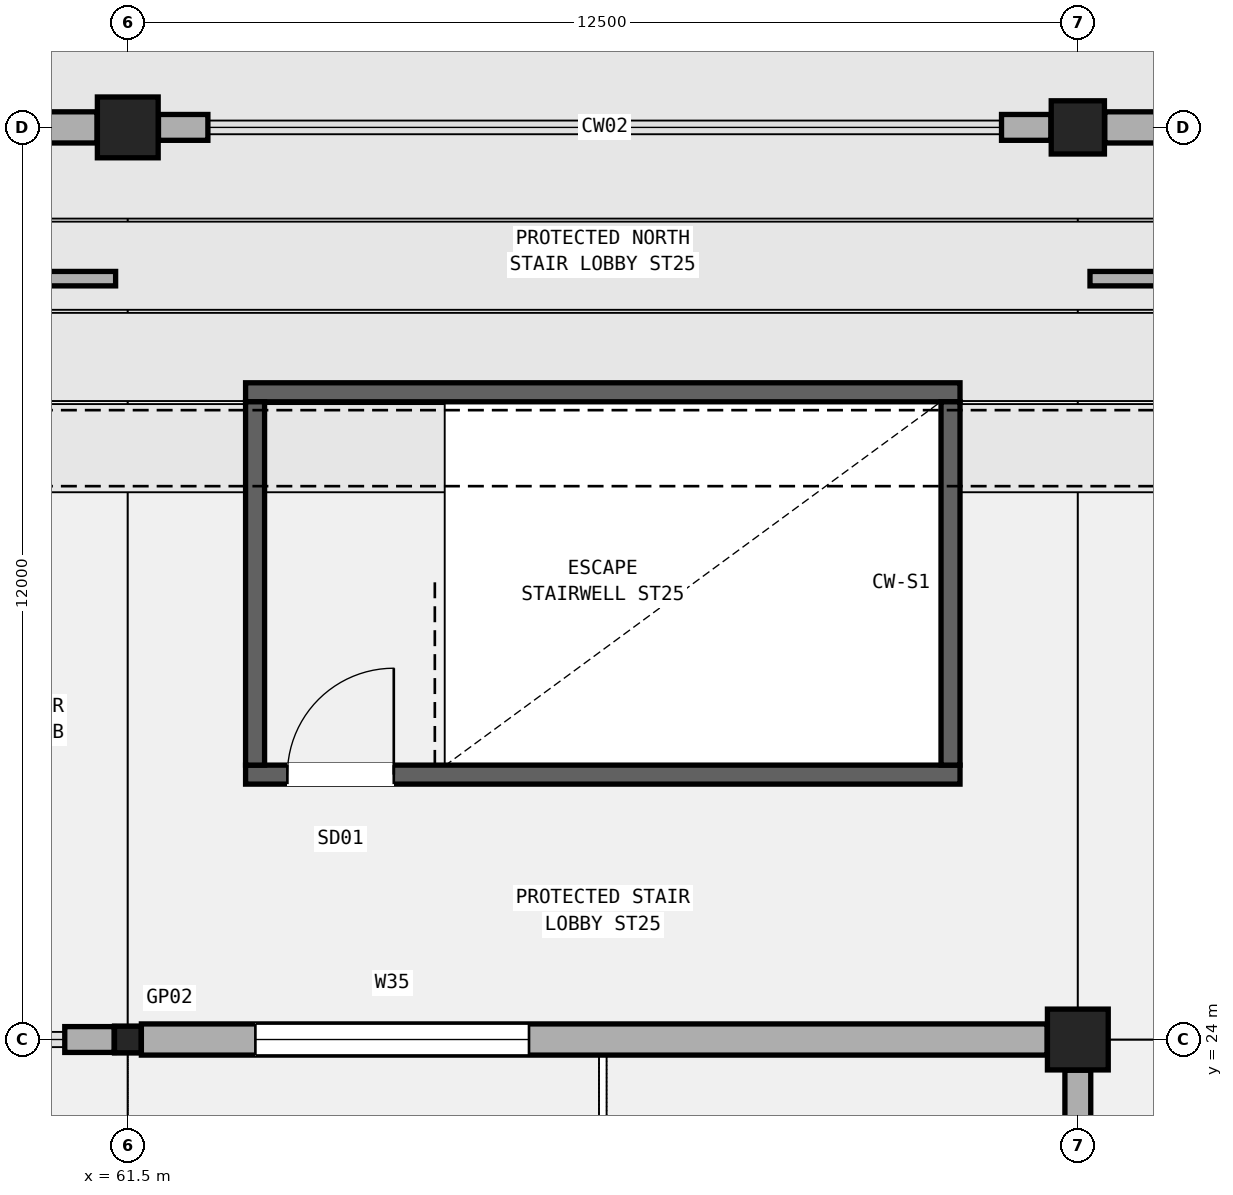
"""IFC4 building model, lengths in metres.
Left out: names, types, materials, properties, quantities, classifications, styles, units other than length and angle.
Written with IfcOpenShell. Run it as: python <this file> out.ifc"""

import sys

from ifc_helpers import new_model, si_unit, direction, frame, frame_2d, origin, origin_2d, place, context, subcontext, project, spatial, rectangle, hollow_rectangle, extrude, element, fill, save


model = new_model("IFC4")
c1 = context("Model", 3, precision=1e-05, world=origin(), true_north=direction((0.0, 1.0)))
c2 = subcontext(c1, "Body", "Model", "MODEL_VIEW")
j1 = project(units=[si_unit("LENGTHUNIT", "METRE"), si_unit("PLANEANGLEUNIT", "RADIAN")], contexts=[c1])
p1 = place(None, origin())
s1 = spatial("IfcSite", under=j1, at=p1, CompositionType="ELEMENT")
p2 = place(p1, origin())
s2 = spatial("IfcBuilding", under=s1, at=p2, CompositionType="ELEMENT")
p3 = place(p2, frame((0.0, 0.0, 15.3)))
s3 = spatial("IfcBuildingStorey", under=s2, at=p3, CompositionType="ELEMENT", Elevation=15.3)
p4 = place(p3, frame((61.5, 24.0, 0.0), z_axis=(0.0, 0.0, 1.0), x_axis=(1.0, 0.0, 0.0)))
e1 = element("IfcColumn", 1, at=p4, inside=s3, PredefinedType="COLUMN", context=c2, shape_type="SweptSolid", body=[
    extrude(hollow_rectangle(XDim=0.35, YDim=0.35, WallThickness=0.016, InnerFilletRadius=0.016, OuterFilletRadius=0.032, at=origin_2d()), origin(), (0.0, 0.0, 1.0), 5.1),
])
for number, where, z_axis, x_axis in (
    (2, (61.5, 36.0, 0.0), (0.0, 0.0, 1.0), (1.0, 0.0, 0.0)),
    (3, (74.0, 24.0, 0.0), (0.0, 0.0, 1.0), (1.0, 0.0, 0.0)),
):
    element("IfcColumn", number, at=place(p3, frame(where, z_axis=z_axis, x_axis=x_axis)), inside=s3, PredefinedType="COLUMN", context=c2, shape_type="SweptSolid", body=[
        extrude(rectangle(XDim=0.8, YDim=0.8, at=origin_2d()), origin(), (0.0, 0.0, 1.0), 5.1),
    ])
p5 = place(p3, frame((74.0, 36.0, 0.0), z_axis=(0.0, 0.0, 1.0), x_axis=(1.0, 0.0, 0.0)))
e4 = element("IfcColumn", 4, at=p5, inside=s3, PredefinedType="COLUMN", context=c2, shape_type="SweptSolid", body=[
    extrude(rectangle(XDim=0.7, YDim=0.7, at=origin_2d()), origin(), (0.0, 0.0, 1.0), 5.1),
])
p6 = place(p3, frame((60.671, 24.0, 0.0), z_axis=(0.0, 0.0, 1.0), x_axis=(1.0, 0.0, 0.0)))
e5 = element("IfcWall", 5, at=p6, inside=s3, PredefinedType="SOLIDWALL", context=c2, shape_type="SweptSolid", body=[
    extrude(rectangle(XDim=0.65, YDim=0.34, at=frame_2d((0.325, 0.0))), origin(), (0.0, 0.0, 1.0), 4.06),
])
p7 = place(p3, frame((49.179, 36.0, 0.0), z_axis=(0.0, 0.0, 1.0), x_axis=(1.0, 0.0, 0.0)))
e6 = element("IfcWall", 6, at=p7, inside=s3, PredefinedType="SOLIDWALL", context=c2, shape_type="SweptSolid", body=[
    extrude(rectangle(XDim=11.917, YDim=0.41, at=frame_2d((5.958, 0.0))), origin(), (0.0, 0.0, 1.0), 4.16),
])
p8 = place(p7, frame((1.5, 0.0, 0.95)))
e7 = element("IfcOpeningElement", 7, at=p8, cuts=e6, PredefinedType="OPENING", context=c2, shape_type="SweptSolid", body=[
    extrude(rectangle(XDim=3.15, YDim=1.9, at=frame_2d((1.575, 0.95))), frame((0.0, 0.215, 0.0), z_axis=(0.0, -1.0, 0.0), x_axis=(1.0, 0.0, 0.0)), (0.0, 0.0, 1.0), 0.43),
])
p9 = place(p3, frame((61.679, 24.0, 0.0), z_axis=(0.0, 0.0, 1.0), x_axis=(1.0, 0.0, 0.0)))
e8 = element("IfcWall", 8, at=p9, inside=s3, PredefinedType="SOLIDWALL", context=c2, shape_type="SweptSolid", body=[
    extrude(rectangle(XDim=11.917, YDim=0.41, at=frame_2d((5.958, 0.0))), origin(), (0.0, 0.0, 1.0), 4.16),
])
p10 = place(p9, frame((1.5, 0.0, 0.95)))
e9 = element("IfcOpeningElement", 9, at=p10, cuts=e8, PredefinedType="OPENING", context=c2, shape_type="SweptSolid", body=[
    extrude(rectangle(XDim=3.6, YDim=1.75, at=frame_2d((1.8, 0.875))), frame((0.0, 0.215, 0.0), z_axis=(0.0, -1.0, 0.0), x_axis=(1.0, 0.0, 0.0)), (0.0, 0.0, 1.0), 0.43),
])
for number, where, z_axis, x_axis in (
    (10, (61.904, 36.0, 0.0), (0.0, 0.0, 1.0), (1.0, 0.0, 0.0)),
    (11, (72.996, 36.0, 0.0), (0.0, 0.0, 1.0), (1.0, 0.0, 0.0)),
):
    element("IfcWall", number, at=place(p3, frame(where, z_axis=z_axis, x_axis=x_axis)), inside=s3, PredefinedType="SOLIDWALL", context=c2, shape_type="SweptSolid", body=[
        extrude(rectangle(XDim=0.65, YDim=0.34, at=frame_2d((0.325, 0.0))), origin(), (0.0, 0.0, 1.0), 4.172),
    ])
p11 = place(p3, frame((74.0, 22.946, 0.0), z_axis=(0.0, 0.0, 1.0), x_axis=(0.0, 1.0, 0.0)))
e12 = element("IfcWall", 12, at=p11, inside=s3, PredefinedType="SOLIDWALL", context=c2, shape_type="SweptSolid", body=[
    extrude(rectangle(XDim=0.65, YDim=0.34, at=frame_2d((0.325, 0.0))), origin(), (0.0, 0.0, 1.0), 4.16),
])
p12 = place(p3, frame((74.354, 36.0, 0.0), z_axis=(0.0, 0.0, 1.0), x_axis=(1.0, 0.0, 0.0)))
e13 = element("IfcWall", 13, at=p12, inside=s3, PredefinedType="SOLIDWALL", context=c2, shape_type="SweptSolid", body=[
    extrude(rectangle(XDim=11.942, YDim=0.41, at=frame_2d((5.971, 0.0))), origin(), (0.0, 0.0, 1.0), 4.06),
])
p13 = place(p12, frame((1.5, 0.0, 0.95)))
e14 = element("IfcOpeningElement", 14, at=p13, cuts=e13, PredefinedType="OPENING", context=c2, shape_type="SweptSolid", body=[
    extrude(rectangle(XDim=0.9, YDim=2.7, at=frame_2d((0.45, 1.35))), frame((0.0, 0.215, 0.0), z_axis=(0.0, -1.0, 0.0), x_axis=(1.0, 0.0, 0.0)), (0.0, 0.0, 1.0), 0.43),
])
p14 = place(p3, frame((63.05, 27.485, 0.0), z_axis=(0.0, 0.0, 1.0), x_axis=(1.0, 0.0, 0.0)))
e15 = element("IfcWall", 15, at=p14, inside=s3, PredefinedType="SHEAR", context=c2, shape_type="SweptSolid", body=[
    extrude(rectangle(XDim=9.4, YDim=0.25, at=frame_2d((4.7, 0.0))), origin(), (0.0, 0.0, 1.0), 4.86),
])
p15 = place(p14, frame((0.55, 0.0, 0.0)))
e16 = element("IfcOpeningElement", 16, at=p15, cuts=e15, PredefinedType="OPENING", context=c2, shape_type="SweptSolid", body=[
    extrude(rectangle(XDim=1.4, YDim=2.15, at=frame_2d((0.7, 1.075))), frame((0.0, 0.135, 0.0), z_axis=(0.0, -1.0, 0.0), x_axis=(1.0, 0.0, 0.0)), (0.0, 0.0, 1.0), 0.27),
])
p16 = place(p3, frame((63.05, 32.515, 0.0), z_axis=(0.0, 0.0, 1.0), x_axis=(1.0, 0.0, 0.0)))
e17 = element("IfcWall", 17, at=p16, inside=s3, PredefinedType="SHEAR", context=c2, shape_type="SweptSolid", body=[
    extrude(rectangle(XDim=9.4, YDim=0.25, at=frame_2d((4.7, 0.0))), origin(), (0.0, 0.0, 1.0), 4.86),
])
for number, where, z_axis, x_axis in (
    (18, (63.175, 27.61, 0.0), (0.0, 0.0, 1.0), (0.0, 1.0, 0.0)),
    (19, (72.325, 27.61, 0.0), (0.0, 0.0, 1.0), (0.0, 1.0, 0.0)),
):
    element("IfcWall", number, at=place(p3, frame(where, z_axis=z_axis, x_axis=x_axis)), inside=s3, PredefinedType="SHEAR", context=c2, shape_type="SweptSolid", body=[
        extrude(rectangle(XDim=4.78, YDim=0.25, at=frame_2d((2.39, 0.0))), origin(), (0.0, 0.0, 1.0), 4.86),
    ])
p17 = place(p3, frame((50.92, 34.01, 0.0), z_axis=(0.0, 0.0, 1.0), x_axis=(1.0, 0.0, 0.0)))
e20 = element("IfcWall", 20, at=p17, inside=s3, PredefinedType="PARTITIONING", context=c2, shape_type="SweptSolid", body=[
    extrude(rectangle(XDim=10.42, YDim=0.19, at=frame_2d((5.21, 0.0))), origin(), (0.0, 0.0, 1.0), 2.77),
])
p18 = place(p17, frame((3.159, 0.0, 0.0), z_axis=(0.0, 0.0, 1.0), x_axis=(-1.0, 0.0, 0.0)))
e21 = element("IfcOpeningElement", 21, at=p18, cuts=e20, PredefinedType="OPENING", context=c2, shape_type="SweptSolid", body=[
    extrude(rectangle(XDim=1.24, YDim=2.22, at=frame_2d((0.62, 1.11))), frame((0.0, 0.105, 0.0), z_axis=(0.0, -1.0, 0.0), x_axis=(1.0, 0.0, 0.0)), (0.0, 0.0, 1.0), 0.21),
])
p19 = place(p17, frame((8.464, 0.0, 0.0), z_axis=(0.0, 0.0, 1.0), x_axis=(-1.0, 0.0, 0.0)))
e22 = element("IfcOpeningElement", 22, at=p19, cuts=e20, PredefinedType="OPENING", context=c2, shape_type="SweptSolid", body=[
    extrude(rectangle(XDim=1.27, YDim=2.2, at=frame_2d((0.635, 1.1))), frame((0.0, 0.105, 0.0), z_axis=(0.0, -1.0, 0.0), x_axis=(1.0, 0.0, 0.0)), (0.0, 0.0, 1.0), 0.21),
])
p20 = place(p3, frame((74.16, 34.01, 0.0), z_axis=(0.0, 0.0, 1.0), x_axis=(1.0, 0.0, 0.0)))
e23 = element("IfcWall", 23, at=p20, inside=s3, PredefinedType="PARTITIONING", context=c2, shape_type="SweptSolid", body=[
    extrude(rectangle(XDim=12.18, YDim=0.19, at=frame_2d((6.09, 0.0))), origin(), (0.0, 0.0, 1.0), 2.77),
])
p21 = place(p20, frame((3.775, 0.0, 0.0), z_axis=(0.0, 0.0, 1.0), x_axis=(-1.0, 0.0, 0.0)))
e24 = element("IfcOpeningElement", 24, at=p21, cuts=e23, PredefinedType="OPENING", context=c2, shape_type="SweptSolid", body=[
    extrude(rectangle(XDim=1.6, YDim=2.3, at=frame_2d((0.8, 1.15))), frame((0.0, 0.105, 0.0), z_axis=(0.0, -1.0, 0.0), x_axis=(1.0, 0.0, 0.0)), (0.0, 0.0, 1.0), 0.21),
])
p22 = place(p20, frame((9.969, 0.0, 0.0), z_axis=(0.0, 0.0, 1.0), x_axis=(-1.0, 0.0, 0.0)))
e25 = element("IfcOpeningElement", 25, at=p22, cuts=e23, PredefinedType="OPENING", context=c2, shape_type="SweptSolid", body=[
    extrude(rectangle(XDim=1.65, YDim=2.28, at=frame_2d((0.825, 1.14))), frame((0.0, 0.105, 0.0), z_axis=(0.0, -1.0, 0.0), x_axis=(1.0, 0.0, 0.0)), (0.0, 0.0, 1.0), 0.21),
])
p23 = place(p10, origin())
e26 = element("IfcWindow", 26, at=p23, inside=s3, PartitioningType="SINGLE_PANEL", PredefinedType="WINDOW", context=c2, shape_type="SweptSolid", body=[
    extrude(rectangle(XDim=3.6, YDim=1.75, at=frame_2d((1.8, 0.875))), frame((0.0, 0.03, 0.0), z_axis=(0.0, -1.0, 0.0), x_axis=(1.0, 0.0, 0.0)), (0.0, 0.0, 1.0), 0.06),
])
fill(e9, e26)
p24 = place(p15, origin())
e27 = element("IfcDoor", 27, at=p24, inside=s3, OperationType="SINGLE_SWING_RIGHT", PredefinedType="DOOR", context=c2, shape_type="SweptSolid", body=[
    extrude(rectangle(XDim=1.4, YDim=2.15, at=frame_2d((0.7, 1.075))), frame((0.0, 0.025, 0.0), z_axis=(0.0, -1.0, 0.0), x_axis=(1.0, 0.0, 0.0)), (0.0, 0.0, 1.0), 0.05),
])
fill(e16, e27)
save(model, sys.argv[1])
